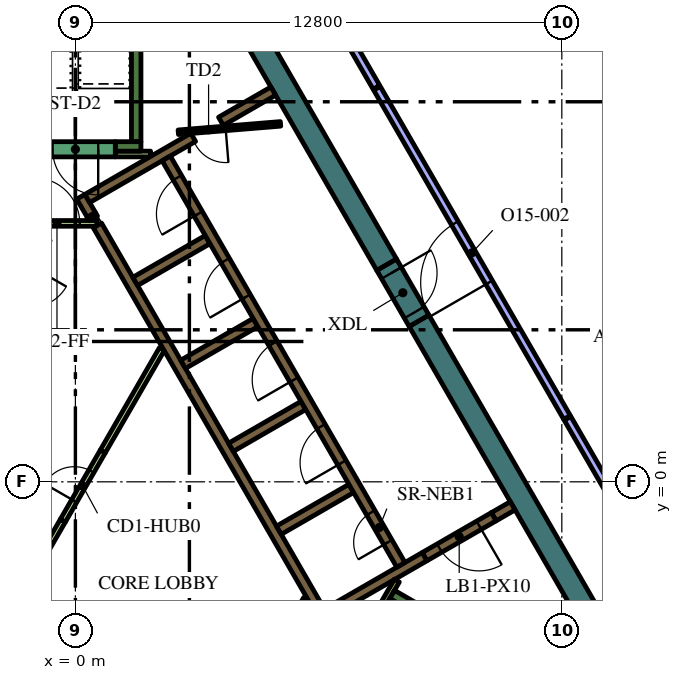
"""IFC4 building model, lengths in metres.
Left out: names, types, materials, properties, quantities, classifications, styles, units other than length and angle.
Written with IfcOpenShell. Run it as: python <this file> out.ifc"""

import sys

from ifc_helpers import new_model, si_unit, direction, frame, frame_2d, origin, place, context, subcontext, project, spatial, rectangle, extrude, element, fill, save


model = new_model("IFC4")
c1 = context("Model", 3, precision=1e-05, world=origin(), true_north=direction((0.0, 1.0)))
c2 = subcontext(c1, "Body", "Model", "MODEL_VIEW")
j1 = project(units=[si_unit("LENGTHUNIT", "METRE"), si_unit("PLANEANGLEUNIT", "RADIAN")], contexts=[c1])
p1 = place(None, origin())
s1 = spatial("IfcSite", under=j1, at=p1, CompositionType="ELEMENT")
p2 = place(p1, origin())
s2 = spatial("IfcBuilding", under=s1, at=p2, CompositionType="ELEMENT")
p3 = place(p2, frame((0.0, 0.0, 317.4)))
s3 = spatial("IfcBuildingStorey", under=s2, at=p3, CompositionType="ELEMENT", Elevation=317.4)
for number, where, z_axis, x_axis in (
    (1, (9.042, 4.239, 0.0), (0.0, 0.0, 1.0), (0.5, -0.866, 0.0)),
    (2, (1.989, 16.456, 0.0), (0.0, 0.0, 1.0), (0.5, -0.866, 0.0)),
):
    element("IfcWall", number, at=place(p3, frame(where, z_axis=z_axis, x_axis=x_axis)), inside=s3, PredefinedType="SOLIDWALL", context=c2, shape_type="SweptSolid", body=[
        extrude(rectangle(XDim=12.406, YDim=0.6, at=frame_2d((6.203, 0.0))), origin(), (0.0, 0.0, 1.0), 4.2),
    ])
p4 = place(p3, frame((8.334, -2.964, 0.0), z_axis=(0.0, 0.0, 1.0), x_axis=(0.866016039709, -0.500016218704, 0.0)))
e3 = element("IfcWall", 3, at=p4, inside=s3, PredefinedType="SOLIDWALL", context=c2, shape_type="SweptSolid", body=[
    extrude(rectangle(XDim=7.05, YDim=0.25, at=frame_2d((3.525, 0.0))), origin(), (0.0, 0.0, 1.0), 4.2),
])
p5 = place(p3, frame((8.168, -3.503, 0.0), z_axis=(0.0, 0.0, 1.0), x_axis=(0.49972245349, 0.866185586049, 0.0)))
e4 = element("IfcWall", 4, at=p5, inside=s3, PredefinedType="SOLIDWALL", context=c2, shape_type="SweptSolid", body=[
    extrude(rectangle(XDim=0.425, YDim=0.25, at=frame_2d((0.212, 0.0))), origin(), (0.0, 0.0, 1.0), 4.2),
])
p6 = place(p3, frame((1.6, 8.95, 0.0), z_axis=(0.0, 0.0, 1.0), x_axis=(0.0, 1.0, 0.0)))
e5 = element("IfcWall", 5, at=p6, inside=s3, PredefinedType="SOLIDWALL", context=c2, shape_type="SweptSolid", body=[
    extrude(rectangle(XDim=6.8, YDim=0.25, at=frame_2d((3.4, 0.0))), origin(), (0.0, 0.0, 1.0), 4.2),
])
p7 = place(p3, frame((1.05, 8.825, 0.0), z_axis=(0.0, 0.0, 1.0), x_axis=(1.0, 0.0, 0.0)))
e6 = element("IfcWall", 6, at=p7, inside=s3, PredefinedType="SOLIDWALL", context=c2, shape_type="SweptSolid", body=[
    extrude(rectangle(XDim=0.675, YDim=0.25, at=frame_2d((0.337, 0.0))), origin(), (0.0, 0.0, 1.0), 4.2),
])
p8 = place(p3, frame((11.507, -0.631, 0.0), z_axis=(0.0, 0.0, 1.0), x_axis=(-0.866093731455, -0.499881634324, 0.0)))
e7 = element("IfcWall", 7, at=p8, inside=s3, PredefinedType="SOLIDWALL", context=c2, shape_type="SweptSolid", body=[
    extrude(rectangle(XDim=0.575, YDim=0.25, at=frame_2d((0.288, 0.0))), origin(), (0.0, 0.0, 1.0), 4.2),
])
p9 = place(p3, frame((0.473, 6.93, 0.0), z_axis=(0.0, 0.0, 1.0), x_axis=(-0.49972245349, 0.866185586049, 0.0)))
e8 = element("IfcWall", 8, at=p9, inside=s3, PredefinedType="SOLIDWALL", context=c2, shape_type="SweptSolid", body=[
    extrude(rectangle(XDim=0.11, YDim=0.25, at=frame_2d((0.055, 0.0))), origin(), (0.0, 0.0, 1.0), 4.2),
])
p10 = place(p3, frame((6.568, -3.627, 0.0), z_axis=(0.0, 0.0, 1.0), x_axis=(-0.499999455981, 0.866025717874, 0.0)))
e9 = element("IfcWall", 9, at=p10, inside=s3, PredefinedType="SOLIDWALL", context=c2, shape_type="SweptSolid", body=[
    extrude(rectangle(XDim=11.978, YDim=0.25, at=frame_2d((5.989, 0.0))), origin(), (0.0, 0.0, 1.0), 4.2),
])
p11 = place(p3, frame((0.417, 7.027, 0.0), z_axis=(0.0, 0.0, 1.0), x_axis=(-0.500210807569, 0.865903659763, 0.0)))
e10 = element("IfcWall", 10, at=p11, inside=s3, PredefinedType="SOLIDWALL", context=c2, shape_type="SweptSolid", body=[
    extrude(rectangle(XDim=0.548, YDim=0.25, at=frame_2d((0.274, 0.0))), origin(), (0.0, 0.0, 1.0), 4.2),
])
p12 = place(p3, frame((3.1, 9.064, 0.0), z_axis=(0.0, 0.0, 1.0), x_axis=(-0.866030133475, -0.499991807846, 0.0)))
e11 = element("IfcWall", 11, at=p12, inside=s3, PredefinedType="SOLIDWALL", context=c2, shape_type="SweptSolid", body=[
    extrude(rectangle(XDim=3.217, YDim=0.25, at=frame_2d((1.608, 0.0))), origin(), (0.0, 0.0, 1.0), 4.2),
])
p13 = place(p3, frame((1.574, 5.274, 0.0), z_axis=(0.0, 0.0, 1.0), x_axis=(0.866028486751, 0.499994660107, 0.0)))
e12 = element("IfcWall", 12, at=p13, inside=s3, PredefinedType="SOLIDWALL", context=c2, shape_type="SweptSolid", body=[
    extrude(rectangle(XDim=2.2, YDim=0.25, at=frame_2d((1.1, 0.0))), origin(), (0.0, 0.0, 1.0), 4.2),
])
for number, where, z_axis, x_axis in (
    (13, (2.834, 3.091, 0.0), (0.0, 0.0, 1.0), (0.866, 0.5, 0.0)),
    (14, (4.094, 0.909, 0.0), (0.0, 0.0, 1.0), (0.866, 0.5, 0.0)),
    (15, (5.354, -1.274, 0.0), (0.0, 0.0, 1.0), (0.866, 0.5, 0.0)),
):
    element("IfcWall", number, at=place(p3, frame(where, z_axis=z_axis, x_axis=x_axis)), inside=s3, PredefinedType="SOLIDWALL", context=c2, shape_type="SweptSolid", body=[
        extrude(rectangle(XDim=2.2, YDim=0.25, at=frame_2d((1.1, 0.0))), origin(), (0.0, 0.0, 1.0), 4.2),
    ])
p14 = place(p3, frame((6.614, -3.456, 0.0), z_axis=(0.0, 0.0, 1.0), x_axis=(0.866032512851, 0.499987686533, 0.0)))
e16 = element("IfcWall", 16, at=p14, inside=s3, PredefinedType="SOLIDWALL", context=c2, shape_type="SweptSolid", body=[
    extrude(rectangle(XDim=2.975, YDim=0.25, at=frame_2d((1.487, 0.0))), origin(), (0.0, 0.0, 1.0), 4.2),
])
p15 = place(p3, frame((3.83, 9.486, 0.0), z_axis=(0.0, 0.0, 1.0), x_axis=(0.865986202621, 0.500067892261, 0.0)))
e17 = element("IfcWall", 17, at=p15, inside=s3, PredefinedType="SOLIDWALL", context=c2, shape_type="SweptSolid", body=[
    extrude(rectangle(XDim=1.591, YDim=0.25, at=frame_2d((0.795, 0.0))), origin(), (0.0, 0.0, 1.0), 4.2),
])
p16 = place(p3, frame((1.05, 8.625, 0.0), z_axis=(0.0, 0.0, 1.0), x_axis=(1.0, 0.0, 0.0)))
e18 = element("IfcWall", 18, at=p16, inside=s3, PredefinedType="PARTITIONING", context=c2, shape_type="SweptSolid", body=[
    extrude(rectangle(XDim=0.929, YDim=0.15, at=frame_2d((0.464, 0.0))), origin(), (0.0, 0.0, 1.0), 3.5),
])
p17 = place(p3, frame((8.459, -2.599, 0.0), z_axis=(0.0, 0.0, 1.0), x_axis=(-0.500041054325, -0.866001699761, 0.0)))
e19 = element("IfcWall", 19, at=p17, inside=s3, PredefinedType="PARTITIONING", context=c2, shape_type="SweptSolid", body=[
    extrude(rectangle(XDim=0.929, YDim=0.15, at=frame_2d((0.464, 0.0))), origin(), (0.0, 0.0, 1.0), 4.2),
])
p18 = place(p3, frame((5.705, -3.718, 0.0), z_axis=(0.0, 0.0, 1.0), x_axis=(0.499962090823, 0.866047289552, 0.0)))
e20 = element("IfcWall", 20, at=p18, inside=s3, PredefinedType="PARTITIONING", context=c2, shape_type="SweptSolid", body=[
    extrude(rectangle(XDim=0.735, YDim=0.15, at=frame_2d((0.367, 0.0))), origin(), (0.0, 0.0, 1.0), 3.5),
])
p19 = place(p3, frame((-1.887, -3.718, 0.0), z_axis=(0.0, 0.0, 1.0), x_axis=(0.500043732237, 0.866000153493, 0.0)))
e21 = element("IfcWall", 21, at=p19, inside=s3, PredefinedType="PARTITIONING", context=c2, shape_type="SweptSolid", body=[
    extrude(rectangle(XDim=3.114, YDim=0.15, at=frame_2d((1.557, 0.0))), origin(), (0.0, 0.0, 1.0), 3.5),
])
p20 = place(p3, frame((0.72, 0.797, 0.0), z_axis=(0.0, 0.0, 1.0), x_axis=(0.499984921984, 0.866034108906, 0.0)))
e22 = element("IfcWall", 22, at=p20, inside=s3, PredefinedType="PARTITIONING", context=c2, shape_type="SweptSolid", body=[
    extrude(rectangle(XDim=3.113, YDim=0.15, at=frame_2d((1.557, 0.0))), origin(), (0.0, 0.0, 1.0), 3.5),
])
p21 = place(p3, frame((8.565, -2.185, 0.0), z_axis=(0.0, 0.0, 1.0), x_axis=(-0.499997954832, 0.866026584559, 0.0)))
e23 = element("IfcWall", 23, at=p21, inside=s3, PredefinedType="SOLIDWALL", context=c2, shape_type="SweptSolid", body=[
    extrude(rectangle(XDim=12.35, YDim=0.25, at=frame_2d((6.175, 0.0))), origin(), (0.0, 0.0, 1.0), 4.2),
])
p22 = place(p21, frame((0.685, 0.0, 0.0)))
e24 = element("IfcOpeningElement", 24, at=p22, cuts=e23, PredefinedType="OPENING", context=c2, shape_type="SweptSolid", body=[
    extrude(rectangle(XDim=0.9, YDim=2.1, at=frame_2d((0.45, 1.05))), frame((0.0, 0.135, 0.0), z_axis=(0.0, -1.0, 0.0), x_axis=(1.0, 0.0, 0.0)), (0.0, 0.0, 1.0), 0.27),
])
p23 = place(p21, frame((3.105, 0.0, 0.0)))
e25 = element("IfcOpeningElement", 25, at=p23, cuts=e23, PredefinedType="OPENING", context=c2, shape_type="SweptSolid", body=[
    extrude(rectangle(XDim=1.1, YDim=2.1, at=frame_2d((0.55, 1.05))), frame((0.0, 0.135, 0.0), z_axis=(0.0, -1.0, 0.0), x_axis=(1.0, 0.0, 0.0)), (0.0, 0.0, 1.0), 0.27),
])
p24 = place(p21, frame((5.625, 0.0, 0.0)))
e26 = element("IfcOpeningElement", 26, at=p24, cuts=e23, PredefinedType="OPENING", context=c2, shape_type="SweptSolid", body=[
    extrude(rectangle(XDim=1.1, YDim=2.1, at=frame_2d((0.55, 1.05))), frame((0.0, 0.135, 0.0), z_axis=(0.0, -1.0, 0.0), x_axis=(1.0, 0.0, 0.0)), (0.0, 0.0, 1.0), 0.27),
])
p25 = place(p21, frame((8.145, 0.0, 0.0)))
e27 = element("IfcOpeningElement", 27, at=p25, cuts=e23, PredefinedType="OPENING", context=c2, shape_type="SweptSolid", body=[
    extrude(rectangle(XDim=1.1, YDim=2.1, at=frame_2d((0.55, 1.05))), frame((0.0, 0.135, 0.0), z_axis=(0.0, -1.0, 0.0), x_axis=(1.0, 0.0, 0.0)), (0.0, 0.0, 1.0), 0.27),
])
p26 = place(p21, frame((10.665, 0.0, 0.0)))
e28 = element("IfcOpeningElement", 28, at=p26, cuts=e23, PredefinedType="OPENING", context=c2, shape_type="SweptSolid", body=[
    extrude(rectangle(XDim=1.1, YDim=2.1, at=frame_2d((0.55, 1.05))), frame((0.0, 0.135, 0.0), z_axis=(0.0, -1.0, 0.0), x_axis=(1.0, 0.0, 0.0)), (0.0, 0.0, 1.0), 0.27),
])
p27 = place(p3, frame((1.05, 8.75, 0.0), z_axis=(0.0, 0.0, 1.0), x_axis=(-1.0, 0.0, 0.0)))
e29 = element("IfcWall", 29, at=p27, inside=s3, PredefinedType="SOLIDWALL", context=c2, shape_type="SweptSolid", body=[
    extrude(rectangle(XDim=2.1, YDim=0.4, at=frame_2d((1.05, 0.0))), origin(), (0.0, 0.0, 1.0), 4.2),
])
p28 = place(p27, frame((0.45, 0.0, 0.0)))
e30 = element("IfcOpeningElement", 30, at=p28, cuts=e29, PredefinedType="OPENING", context=c2, shape_type="SweptSolid", body=[
    extrude(rectangle(XDim=1.2, YDim=2.1, at=frame_2d((0.6, 1.05))), frame((0.0, 0.21, 0.0), z_axis=(0.0, -1.0, 0.0), x_axis=(1.0, 0.0, 0.0)), (0.0, 0.0, 1.0), 0.42),
])
p29 = place(p3, frame((5.398, 9.419, 0.0), z_axis=(0.0, 0.0, 1.0), x_axis=(-0.996653416376, -0.081743303248, 0.0)))
e31 = element("IfcWall", 31, at=p29, inside=s3, PredefinedType="PARTITIONING", context=c2, shape_type="SweptSolid", body=[
    extrude(rectangle(XDim=2.7, YDim=0.12, at=frame_2d((1.35, 0.0))), origin(), (0.0, 0.0, 1.0), 3.5),
])
p30 = place(p29, frame((1.45, 0.0, 0.0)))
e32 = element("IfcOpeningElement", 32, at=p30, cuts=e31, PredefinedType="OPENING", context=c2, shape_type="SweptSolid", body=[
    extrude(rectangle(XDim=0.9, YDim=2.1, at=frame_2d((0.45, 1.05))), frame((0.0, 0.07, 0.0), z_axis=(0.0, -1.0, 0.0), x_axis=(1.0, 0.0, 0.0)), (0.0, 0.0, 1.0), 0.14),
])
p31 = place(p3, frame((-0.33, -1.022, 0.0), z_axis=(0.0, 0.0, 1.0), x_axis=(0.500027713859, 0.866009402589, 0.0)))
e33 = element("IfcWall", 33, at=p31, inside=s3, PredefinedType="PARTITIONING", context=c2, shape_type="SweptSolid", body=[
    extrude(rectangle(XDim=2.1, YDim=0.15, at=frame_2d((1.05, 0.0))), origin(), (0.0, 0.0, 1.0), 3.5),
])
p32 = place(p31, frame((0.6, 0.0, 0.0)))
e34 = element("IfcOpeningElement", 34, at=p32, cuts=e33, PredefinedType="OPENING", context=c2, shape_type="SweptSolid", body=[
    extrude(rectangle(XDim=0.9, YDim=2.1, at=frame_2d((0.45, 1.05))), frame((0.0, 0.085, 0.0), z_axis=(0.0, -1.0, 0.0), x_axis=(1.0, 0.0, 0.0)), (0.0, 0.0, 1.0), 0.17),
])
p33 = place(p3, frame((-1.534, 6.8, 0.0), z_axis=(0.0, 0.0, 1.0), x_axis=(1.0, 0.0, 0.0)))
e35 = element("IfcWall", 35, at=p33, inside=s3, PredefinedType="PARTITIONING", context=c2, shape_type="SweptSolid", body=[
    extrude(rectangle(XDim=2.1, YDim=0.15, at=frame_2d((1.05, 0.0))), origin(), (0.0, 0.0, 1.0), 3.5),
])
p34 = place(p33, frame((0.45, 0.0, 0.0)))
e36 = element("IfcOpeningElement", 36, at=p34, cuts=e35, PredefinedType="OPENING", context=c2, shape_type="SweptSolid", body=[
    extrude(rectangle(XDim=1.2, YDim=2.1, at=frame_2d((0.6, 1.05))), frame((0.0, 0.085, 0.0), z_axis=(0.0, -1.0, 0.0), x_axis=(1.0, 0.0, 0.0)), (0.0, 0.0, 1.0), 0.17),
])
p35 = place(p3, frame((11.009, -0.919, 0.0), z_axis=(0.0, 0.0, 1.0), x_axis=(-0.866059744384, -0.49994051562, 0.0)))
e37 = element("IfcWall", 37, at=p35, inside=s3, PredefinedType="SOLIDWALL", context=c2, shape_type="SweptSolid", body=[
    extrude(rectangle(XDim=2.1, YDim=0.25, at=frame_2d((1.05, 0.0))), origin(), (0.0, 0.0, 1.0), 4.2),
])
p36 = place(p35, frame((0.45, 0.0, 0.0)))
e38 = element("IfcOpeningElement", 38, at=p36, cuts=e37, PredefinedType="OPENING", context=c2, shape_type="SweptSolid", body=[
    extrude(rectangle(XDim=1.2, YDim=2.1, at=frame_2d((0.6, 1.05))), frame((0.0, 0.135, 0.0), z_axis=(0.0, -1.0, 0.0), x_axis=(1.0, 0.0, 0.0)), (0.0, 0.0, 1.0), 0.27),
])
p37 = place(p3, frame((8.192, 5.711, 0.0), z_axis=(0.0, 0.0, 1.0), x_axis=(0.500062241894, -0.865989465428, 0.0)))
e39 = element("IfcWall", 39, at=p37, inside=s3, PredefinedType="SOLIDWALL", context=c2, shape_type="SweptSolid", body=[
    extrude(rectangle(XDim=1.7, YDim=0.6, at=frame_2d((0.85, 0.0))), origin(), (0.0, 0.0, 1.0), 4.2),
])
p38 = place(p37, frame((0.25, 0.0, 0.0)))
e40 = element("IfcOpeningElement", 40, at=p38, cuts=e39, PredefinedType="OPENING", context=c2, shape_type="SweptSolid", body=[
    extrude(rectangle(XDim=1.2, YDim=2.1, at=frame_2d((0.6, 1.05))), frame((0.0, 0.31, 0.0), z_axis=(0.0, -1.0, 0.0), x_axis=(1.0, 0.0, 0.0)), (0.0, 0.0, 1.0), 0.62),
])
p39 = place(p3, frame((12.936, 1.695, 0.0), z_axis=(0.0, 0.0, 1.0), x_axis=(-0.500004234368, 0.866022959057, 0.0)))
e41 = element("IfcWall", 41, at=p39, inside=s3, PredefinedType="PARTITIONING", context=c2, shape_type="SweptSolid", body=[
    extrude(rectangle(XDim=10.0, YDim=0.2, at=frame_2d((5.0, 0.0))), origin(), (0.0, 0.0, 1.0), 3.5),
])
p40 = place(p39, frame((4.1, 0.0, 0.0)))
e42 = element("IfcOpeningElement", 42, at=p40, cuts=e41, PredefinedType="OPENING", context=c2, shape_type="SweptSolid", body=[
    extrude(rectangle(XDim=1.8, YDim=2.1, at=frame_2d((0.9, 1.05))), frame((0.0, 0.11, 0.0), z_axis=(0.0, -1.0, 0.0), x_axis=(1.0, 0.0, 0.0)), (0.0, 0.0, 1.0), 0.22),
])
p41 = place(p3, frame((7.921, 10.381, 0.0), z_axis=(0.0, 0.0, 1.0), x_axis=(-0.500021625289, 0.866012918058, 0.0)))
e43 = element("IfcWall", 43, at=p41, inside=s3, PredefinedType="PARTITIONING", context=c2, shape_type="SweptSolid", body=[
    extrude(rectangle(XDim=4.497, YDim=0.2, at=frame_2d((2.249, 0.0))), origin(), (0.0, 0.0, 1.0), 3.5),
])
p42 = place(p3, frame((17.565, -6.324, 0.0), z_axis=(0.0, 0.0, 1.0), x_axis=(-0.49998273032, 0.866035374209, 0.0)))
e44 = element("IfcWall", 44, at=p42, inside=s3, PredefinedType="PARTITIONING", context=c2, shape_type="SweptSolid", body=[
    extrude(rectangle(XDim=9.229, YDim=0.2, at=frame_2d((4.615, 0.0))), origin(), (0.0, 0.0, 1.0), 3.5),
])
p43 = place(p22, origin())
e45 = element("IfcDoor", 45, at=p43, inside=s3, OperationType="SINGLE_SWING_LEFT", PredefinedType="DOOR", context=c2, shape_type="SweptSolid", body=[
    extrude(rectangle(XDim=0.9, YDim=2.1, at=frame_2d((0.45, 1.05))), frame((0.0, 0.025, 0.0), z_axis=(0.0, -1.0, 0.0), x_axis=(1.0, 0.0, 0.0)), (0.0, 0.0, 1.0), 0.05),
])
fill(e24, e45)
p44 = place(p23, origin())
e46 = element("IfcDoor", 46, at=p44, inside=s3, OperationType="DOUBLE_DOOR_SLIDING", PredefinedType="DOOR", context=c2, shape_type="SweptSolid", body=[
    extrude(rectangle(XDim=1.1, YDim=2.1, at=frame_2d((0.55, 1.05))), frame((0.0, 0.025, 0.0), z_axis=(0.0, -1.0, 0.0), x_axis=(1.0, 0.0, 0.0)), (0.0, 0.0, 1.0), 0.05),
])
fill(e25, e46)
p45 = place(p24, origin())
e47 = element("IfcDoor", 47, at=p45, inside=s3, OperationType="DOUBLE_DOOR_SLIDING", PredefinedType="DOOR", context=c2, shape_type="SweptSolid", body=[
    extrude(rectangle(XDim=1.1, YDim=2.1, at=frame_2d((0.55, 1.05))), frame((0.0, 0.025, 0.0), z_axis=(0.0, -1.0, 0.0), x_axis=(1.0, 0.0, 0.0)), (0.0, 0.0, 1.0), 0.05),
])
fill(e26, e47)
p46 = place(p25, origin())
e48 = element("IfcDoor", 48, at=p46, inside=s3, OperationType="DOUBLE_DOOR_SLIDING", PredefinedType="DOOR", context=c2, shape_type="SweptSolid", body=[
    extrude(rectangle(XDim=1.1, YDim=2.1, at=frame_2d((0.55, 1.05))), frame((0.0, 0.025, 0.0), z_axis=(0.0, -1.0, 0.0), x_axis=(1.0, 0.0, 0.0)), (0.0, 0.0, 1.0), 0.05),
])
fill(e27, e48)
p47 = place(p26, origin())
e49 = element("IfcDoor", 49, at=p47, inside=s3, OperationType="DOUBLE_DOOR_SLIDING", PredefinedType="DOOR", context=c2, shape_type="SweptSolid", body=[
    extrude(rectangle(XDim=1.1, YDim=2.1, at=frame_2d((0.55, 1.05))), frame((0.0, 0.025, 0.0), z_axis=(0.0, -1.0, 0.0), x_axis=(1.0, 0.0, 0.0)), (0.0, 0.0, 1.0), 0.05),
])
fill(e28, e49)
p48 = place(p28, origin())
e50 = element("IfcDoor", 50, at=p48, inside=s3, OperationType="SINGLE_SWING_LEFT", PredefinedType="DOOR", context=c2, shape_type="SweptSolid", body=[
    extrude(rectangle(XDim=1.2, YDim=2.1, at=frame_2d((0.6, 1.05))), frame((0.0, 0.025, 0.0), z_axis=(0.0, -1.0, 0.0), x_axis=(1.0, 0.0, 0.0)), (0.0, 0.0, 1.0), 0.05),
])
fill(e30, e50)
p49 = place(p30, origin())
e51 = element("IfcDoor", 51, at=p49, inside=s3, OperationType="SINGLE_SWING_LEFT", PredefinedType="DOOR", context=c2, shape_type="SweptSolid", body=[
    extrude(rectangle(XDim=0.9, YDim=2.1, at=frame_2d((0.45, 1.05))), frame((0.0, 0.025, 0.0), z_axis=(0.0, -1.0, 0.0), x_axis=(1.0, 0.0, 0.0)), (0.0, 0.0, 1.0), 0.05),
])
fill(e32, e51)
p50 = place(p32, origin())
e52 = element("IfcDoor", 52, at=p50, inside=s3, OperationType="SINGLE_SWING_LEFT", PredefinedType="DOOR", context=c2, shape_type="SweptSolid", body=[
    extrude(rectangle(XDim=0.9, YDim=2.1, at=frame_2d((0.45, 1.05))), frame((0.0, 0.025, 0.0), z_axis=(0.0, -1.0, 0.0), x_axis=(1.0, 0.0, 0.0)), (0.0, 0.0, 1.0), 0.05),
])
fill(e34, e52)
p51 = place(p34, origin())
e53 = element("IfcDoor", 53, at=p51, inside=s3, OperationType="SINGLE_SWING_LEFT", PredefinedType="DOOR", context=c2, shape_type="SweptSolid", body=[
    extrude(rectangle(XDim=1.2, YDim=2.1, at=frame_2d((0.6, 1.05))), frame((0.0, 0.025, 0.0), z_axis=(0.0, -1.0, 0.0), x_axis=(1.0, 0.0, 0.0)), (0.0, 0.0, 1.0), 0.05),
])
fill(e36, e53)
p52 = place(p36, origin())
e54 = element("IfcDoor", 54, at=p52, inside=s3, OperationType="SINGLE_SWING_LEFT", PredefinedType="DOOR", context=c2, shape_type="SweptSolid", body=[
    extrude(rectangle(XDim=1.2, YDim=2.1, at=frame_2d((0.6, 1.05))), frame((0.0, 0.025, 0.0), z_axis=(0.0, -1.0, 0.0), x_axis=(1.0, 0.0, 0.0)), (0.0, 0.0, 1.0), 0.05),
])
fill(e38, e54)
p53 = place(p38, origin())
e55 = element("IfcDoor", 55, at=p53, inside=s3, OperationType="SINGLE_SWING_LEFT", PredefinedType="DOOR", context=c2, shape_type="SweptSolid", body=[
    extrude(rectangle(XDim=1.2, YDim=2.1, at=frame_2d((0.6, 1.05))), frame((0.0, 0.025, 0.0), z_axis=(0.0, -1.0, 0.0), x_axis=(1.0, 0.0, 0.0)), (0.0, 0.0, 1.0), 0.05),
])
fill(e40, e55)
p54 = place(p40, origin())
e56 = element("IfcDoor", 56, at=p54, inside=s3, OperationType="DOUBLE_DOOR_SINGLE_SWING", PredefinedType="DOOR", context=c2, shape_type="SweptSolid", body=[
    extrude(rectangle(XDim=1.8, YDim=2.1, at=frame_2d((0.9, 1.05))), frame((0.0, 0.025, 0.0), z_axis=(0.0, -1.0, 0.0), x_axis=(1.0, 0.0, 0.0)), (0.0, 0.0, 1.0), 0.05),
])
fill(e42, e56)
save(model, sys.argv[1])
